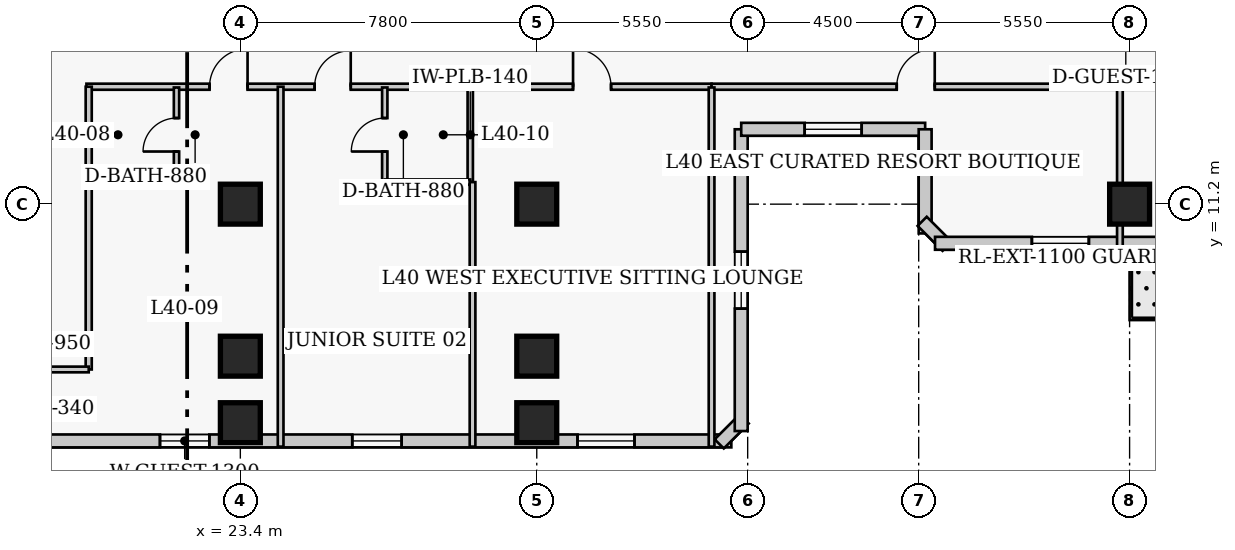
"""IFC4 building model, lengths in metres.
Left out: names, types, materials, properties, quantities, classifications, styles, units other than length and angle.
Written with IfcOpenShell. Run it as: python <this file> out.ifc"""

import sys

from ifc_helpers import new_model, si_unit, direction, frame, frame_2d, origin, origin_2d, place, context, subcontext, project, spatial, rectangle, extrude, element, fill, save


model = new_model("IFC4")
c1 = context("Model", 3, precision=1e-05, world=origin(), true_north=direction((0.0, 1.0)))
c2 = subcontext(c1, "Body", "Model", "MODEL_VIEW")
j1 = project(units=[si_unit("LENGTHUNIT", "METRE"), si_unit("PLANEANGLEUNIT", "RADIAN")], contexts=[c1])
p1 = place(None, origin())
s1 = spatial("IfcSite", under=j1, at=p1, CompositionType="ELEMENT")
p2 = place(p1, origin())
s2 = spatial("IfcBuilding", under=s1, at=p2, CompositionType="ELEMENT")
p3 = place(p2, frame((0.0, 0.0, 161.2)))
s3 = spatial("IfcBuildingStorey", under=s2, at=p3, CompositionType="ELEMENT", Elevation=161.2)
for number, where, z_axis, x_axis in (
    (1, (23.4, 11.2, 0.0), (0.0, 0.0, 1.0), (1.0, 0.0, 0.0)),
    (2, (31.2, 11.2, 0.0), (0.0, 0.0, 1.0), (1.0, 0.0, 0.0)),
    (3, (46.8, 11.2, 0.0), (0.0, 0.0, 1.0), (1.0, 0.0, 0.0)),
    (4, (23.4, 7.2, 0.0), (0.0, 0.0, 1.0), (1.0, 0.0, 0.0)),
    (5, (31.2, 7.2, 0.0), (0.0, 0.0, 1.0), (1.0, 0.0, 0.0)),
    (6, (23.4, 5.45, 0.0), (0.0, 0.0, 1.0), (1.0, 0.0, 0.0)),
    (7, (31.2, 5.45, 0.0), (0.0, 0.0, 1.0), (1.0, 0.0, 0.0)),
):
    element("IfcColumn", number, at=place(p3, frame(where, z_axis=z_axis, x_axis=x_axis)), inside=s3, PredefinedType="COLUMN", context=c2, shape_type="SweptSolid", body=[
        extrude(rectangle(XDim=1.05, YDim=1.05, at=origin_2d()), origin(), (0.0, 0.0, 1.0), 3.8),
    ])
p4 = place(p3, frame((9.63, 4.97, 0.0), z_axis=(0.0, 0.0, 1.0), x_axis=(1.0, 0.0, 0.0)))
e8 = element("IfcWall", 8, at=p4, inside=s3, PredefinedType="SOLIDWALL", context=c2, shape_type="SweptSolid", body=[
    extrude(rectangle(XDim=26.69, YDim=0.34, at=frame_2d((13.345, 0.0))), origin(), (0.0, 0.0, 1.0), 3.55),
])
p5 = place(p4, frame((3.048, 0.0, 0.85)))
e9 = element("IfcOpeningElement", 9, at=p5, cuts=e8, PredefinedType="OPENING", context=c2, shape_type="SweptSolid", body=[
    extrude(rectangle(XDim=1.5, YDim=1.75, at=frame_2d((0.75, 0.875))), frame((0.0, 0.18, 0.0), z_axis=(0.0, -1.0, 0.0), x_axis=(1.0, 0.0, 0.0)), (0.0, 0.0, 1.0), 0.36),
])
p6 = place(p4, frame((22.642, 0.0, 0.85)))
e10 = element("IfcOpeningElement", 10, at=p6, cuts=e8, PredefinedType="OPENING", context=c2, shape_type="SweptSolid", body=[
    extrude(rectangle(XDim=1.5, YDim=1.75, at=frame_2d((0.75, 0.875))), frame((0.0, 0.18, 0.0), z_axis=(0.0, -1.0, 0.0), x_axis=(1.0, 0.0, 0.0)), (0.0, 0.0, 1.0), 0.36),
])
p7 = place(p4, frame((11.655, 0.0, 0.85)))
e11 = element("IfcOpeningElement", 11, at=p7, cuts=e8, PredefinedType="OPENING", context=c2, shape_type="SweptSolid", body=[
    extrude(rectangle(XDim=1.3, YDim=1.7, at=frame_2d((0.65, 0.85))), frame((0.0, 0.18, 0.0), z_axis=(0.0, -1.0, 0.0), x_axis=(1.0, 0.0, 0.0)), (0.0, 0.0, 1.0), 0.36),
])
p8 = place(p4, frame((16.715, 0.0, 0.85)))
e12 = element("IfcOpeningElement", 12, at=p8, cuts=e8, PredefinedType="OPENING", context=c2, shape_type="SweptSolid", body=[
    extrude(rectangle(XDim=1.3, YDim=1.7, at=frame_2d((0.65, 0.85))), frame((0.0, 0.18, 0.0), z_axis=(0.0, -1.0, 0.0), x_axis=(1.0, 0.0, 0.0)), (0.0, 0.0, 1.0), 0.36),
])
p9 = place(p3, frame((36.001, 4.892, 0.0), z_axis=(0.0, 0.0, 1.0), x_axis=(0.707106781187, 0.707106781187, 0.0)))
e13 = element("IfcWall", 13, at=p9, inside=s3, PredefinedType="SOLIDWALL", context=c2, shape_type="SweptSolid", body=[
    extrude(rectangle(XDim=0.929, YDim=0.34, at=frame_2d((0.464, 0.0))), origin(), (0.0, 0.0, 1.0), 3.55),
])
p10 = place(p3, frame((36.58, 5.23, 0.0), z_axis=(0.0, 0.0, 1.0), x_axis=(0.0, 1.0, 0.0)))
e14 = element("IfcWall", 14, at=p10, inside=s3, PredefinedType="SOLIDWALL", context=c2, shape_type="SweptSolid", body=[
    extrude(rectangle(XDim=7.94, YDim=0.34, at=frame_2d((3.97, 0.0))), origin(), (0.0, 0.0, 1.0), 3.55),
])
p11 = place(p10, frame((3.22, 0.0, 0.85)))
e15 = element("IfcOpeningElement", 15, at=p11, cuts=e14, PredefinedType="OPENING", context=c2, shape_type="SweptSolid", body=[
    extrude(rectangle(XDim=1.5, YDim=1.75, at=frame_2d((0.75, 0.875))), frame((0.0, 0.18, 0.0), z_axis=(0.0, -1.0, 0.0), x_axis=(1.0, 0.0, 0.0)), (0.0, 0.0, 1.0), 0.36),
])
p12 = place(p3, frame((36.58, 13.17, 0.0), z_axis=(0.0, 0.0, 1.0), x_axis=(1.0, 0.0, 0.0)))
e16 = element("IfcWall", 16, at=p12, inside=s3, PredefinedType="SOLIDWALL", context=c2, shape_type="SweptSolid", body=[
    extrude(rectangle(XDim=4.84, YDim=0.34, at=frame_2d((2.42, 0.0))), origin(), (0.0, 0.0, 1.0), 3.55),
])
p13 = place(p12, frame((1.67, 0.0, 0.85)))
e17 = element("IfcOpeningElement", 17, at=p13, cuts=e16, PredefinedType="OPENING", context=c2, shape_type="SweptSolid", body=[
    extrude(rectangle(XDim=1.5, YDim=1.75, at=frame_2d((0.75, 0.875))), frame((0.0, 0.18, 0.0), z_axis=(0.0, -1.0, 0.0), x_axis=(1.0, 0.0, 0.0)), (0.0, 0.0, 1.0), 0.36),
])
p14 = place(p3, frame((41.42, 13.17, 0.0), z_axis=(0.0, 0.0, 1.0), x_axis=(0.0, -1.0, 0.0)))
e18 = element("IfcWall", 18, at=p14, inside=s3, PredefinedType="SOLIDWALL", context=c2, shape_type="SweptSolid", body=[
    extrude(rectangle(XDim=2.74, YDim=0.34, at=frame_2d((1.37, 0.0))), origin(), (0.0, 0.0, 1.0), 3.55),
])
p15 = place(p3, frame((41.342, 10.749, 0.0), z_axis=(0.0, 0.0, 1.0), x_axis=(0.707106781187, -0.707106781187, 0.0)))
e19 = element("IfcWall", 19, at=p15, inside=s3, PredefinedType="SOLIDWALL", context=c2, shape_type="SweptSolid", body=[
    extrude(rectangle(XDim=0.929, YDim=0.34, at=frame_2d((0.464, 0.0))), origin(), (0.0, 0.0, 1.0), 3.55),
])
p16 = place(p3, frame((41.68, 10.17, 0.0), z_axis=(0.0, 0.0, 1.0), x_axis=(1.0, 0.0, 0.0)))
e20 = element("IfcWall", 20, at=p16, inside=s3, PredefinedType="SOLIDWALL", context=c2, shape_type="SweptSolid", body=[
    extrude(rectangle(XDim=26.69, YDim=0.34, at=frame_2d((13.345, 0.0))), origin(), (0.0, 0.0, 1.0), 3.55),
])
p17 = place(p16, frame((2.548, 0.0, 0.85)))
e21 = element("IfcOpeningElement", 21, at=p17, cuts=e20, PredefinedType="OPENING", context=c2, shape_type="SweptSolid", body=[
    extrude(rectangle(XDim=1.5, YDim=1.75, at=frame_2d((0.75, 0.875))), frame((0.0, 0.18, 0.0), z_axis=(0.0, -1.0, 0.0), x_axis=(1.0, 0.0, 0.0)), (0.0, 0.0, 1.0), 0.36),
])
p18 = place(p16, frame((13.745, 0.0, 0.85)))
e22 = element("IfcOpeningElement", 22, at=p18, cuts=e20, PredefinedType="OPENING", context=c2, shape_type="SweptSolid", body=[
    extrude(rectangle(XDim=1.5, YDim=1.75, at=frame_2d((0.75, 0.875))), frame((0.0, 0.18, 0.0), z_axis=(0.0, -1.0, 0.0), x_axis=(1.0, 0.0, 0.0)), (0.0, 0.0, 1.0), 0.36),
])
p19 = place(p16, frame((21.492, 0.0, 0.85)))
e23 = element("IfcOpeningElement", 23, at=p19, cuts=e20, PredefinedType="OPENING", context=c2, shape_type="SweptSolid", body=[
    extrude(rectangle(XDim=1.5, YDim=1.75, at=frame_2d((0.75, 0.875))), frame((0.0, 0.18, 0.0), z_axis=(0.0, -1.0, 0.0), x_axis=(1.0, 0.0, 0.0)), (0.0, 0.0, 1.0), 0.36),
])
p20 = place(p16, frame((8.42, 0.0, 0.0)))
e24 = element("IfcOpeningElement", 24, at=p20, cuts=e20, PredefinedType="OPENING", context=c2, shape_type="SweptSolid", body=[
    extrude(rectangle(XDim=1.2, YDim=2.1, at=frame_2d((0.6, 1.05))), frame((0.0, 0.18, 0.0), z_axis=(0.0, -1.0, 0.0), x_axis=(1.0, 0.0, 0.0)), (0.0, 0.0, 1.0), 0.36),
])
p21 = place(p3, frame((19.35, 14.29, 0.0), z_axis=(0.0, 0.0, 1.0), x_axis=(1.0, 0.0, 0.0)))
e25 = element("IfcWall", 25, at=p21, inside=s3, PredefinedType="PARTITIONING", context=c2, shape_type="SweptSolid", body=[
    extrude(rectangle(XDim=16.45, YDim=0.16, at=frame_2d((8.225, 0.0))), origin(), (0.0, 0.0, 1.0), 3.55),
])
p22 = place(p21, frame((3.24, 0.0, 0.0)))
e26 = element("IfcOpeningElement", 26, at=p22, cuts=e25, PredefinedType="OPENING", context=c2, shape_type="SweptSolid", body=[
    extrude(rectangle(XDim=1.0, YDim=2.15, at=frame_2d((0.5, 1.075))), frame((0.0, 0.09, 0.0), z_axis=(0.0, -1.0, 0.0), x_axis=(1.0, 0.0, 0.0)), (0.0, 0.0, 1.0), 0.18),
])
p23 = place(p21, frame((6.005, 0.0, 0.0)))
e27 = element("IfcOpeningElement", 27, at=p23, cuts=e25, PredefinedType="OPENING", context=c2, shape_type="SweptSolid", body=[
    extrude(rectangle(XDim=0.95, YDim=2.1, at=frame_2d((0.475, 1.05))), frame((0.0, 0.09, 0.0), z_axis=(0.0, -1.0, 0.0), x_axis=(1.0, 0.0, 0.0)), (0.0, 0.0, 1.0), 0.18),
])
p24 = place(p21, frame((12.805, 0.0, 0.0)))
e28 = element("IfcOpeningElement", 28, at=p24, cuts=e25, PredefinedType="OPENING", context=c2, shape_type="SweptSolid", body=[
    extrude(rectangle(XDim=1.0, YDim=2.15, at=frame_2d((0.5, 1.075))), frame((0.0, 0.09, 0.0), z_axis=(0.0, -1.0, 0.0), x_axis=(1.0, 0.0, 0.0)), (0.0, 0.0, 1.0), 0.18),
])
p25 = place(p3, frame((35.8, 14.29, 0.0), z_axis=(0.0, 0.0, 1.0), x_axis=(1.0, 0.0, 0.0)))
e29 = element("IfcWall", 29, at=p25, inside=s3, PredefinedType="PARTITIONING", context=c2, shape_type="SweptSolid", body=[
    extrude(rectangle(XDim=22.65, YDim=0.16, at=frame_2d((11.325, 0.0))), origin(), (0.0, 0.0, 1.0), 3.55),
])
p26 = place(p25, frame((4.873, 0.0, 0.0)))
e30 = element("IfcOpeningElement", 30, at=p26, cuts=e29, PredefinedType="OPENING", context=c2, shape_type="SweptSolid", body=[
    extrude(rectangle(XDim=1.0, YDim=2.15, at=frame_2d((0.5, 1.075))), frame((0.0, 0.09, 0.0), z_axis=(0.0, -1.0, 0.0), x_axis=(1.0, 0.0, 0.0)), (0.0, 0.0, 1.0), 0.18),
])
p27 = place(p3, frame((19.41, 6.85, 0.0), z_axis=(0.0, 0.0, 1.0), x_axis=(0.0, 1.0, 0.0)))
e31 = element("IfcWall", 31, at=p27, inside=s3, PredefinedType="PARTITIONING", context=c2, shape_type="SweptSolid", body=[
    extrude(rectangle(XDim=7.44, YDim=0.16, at=frame_2d((3.72, 0.0))), origin(), (0.0, 0.0, 1.0), 3.093),
])
p28 = place(p3, frame((17.19, 6.85, 0.0), z_axis=(0.0, 0.0, 1.0), x_axis=(1.0, 0.0, 0.0)))
e32 = element("IfcWall", 32, at=p28, inside=s3, PredefinedType="PARTITIONING", context=c2, shape_type="SweptSolid", body=[
    extrude(rectangle(XDim=2.22, YDim=0.15, at=frame_2d((1.11, 0.0))), origin(), (0.0, 0.0, 1.0), 3.55),
])
p29 = place(p3, frame((21.72, 11.78, 0.0), z_axis=(0.0, 0.0, 1.0), x_axis=(0.0, 1.0, 0.0)))
e33 = element("IfcWall", 33, at=p29, inside=s3, PredefinedType="PLUMBINGWALL", context=c2, shape_type="SweptSolid", body=[
    extrude(rectangle(XDim=2.49, YDim=0.14, at=frame_2d((1.245, 0.0))), origin(), (0.0, 0.0, 1.0), 3.55),
])
p30 = place(p29, frame((0.805, 0.0, 0.0)))
e34 = element("IfcOpeningElement", 34, at=p30, cuts=e33, PredefinedType="OPENING", context=c2, shape_type="SweptSolid", body=[
    extrude(rectangle(XDim=0.88, YDim=2.05, at=frame_2d((0.44, 1.025))), frame((0.0, 0.08, 0.0), z_axis=(0.0, -1.0, 0.0), x_axis=(1.0, 0.0, 0.0)), (0.0, 0.0, 1.0), 0.16),
])
p31 = place(p3, frame((19.47, 11.78, 0.0), z_axis=(0.0, 0.0, 1.0), x_axis=(1.0, 0.0, 0.0)))
e35 = element("IfcWall", 35, at=p31, inside=s3, PredefinedType="PLUMBINGWALL", context=c2, shape_type="SweptSolid", body=[
    extrude(rectangle(XDim=2.25, YDim=0.14, at=frame_2d((1.125, 0.0))), origin(), (0.0, 0.0, 1.0), 3.55),
])
p32 = place(p3, frame((24.46, 4.82, 0.0), z_axis=(0.0, 0.0, 1.0), x_axis=(0.0, 1.0, 0.0)))
e36 = element("IfcWall", 36, at=p32, inside=s3, PredefinedType="PARTITIONING", context=c2, shape_type="SweptSolid", body=[
    extrude(rectangle(XDim=9.47, YDim=0.15, at=frame_2d((4.735, 0.0))), origin(), (0.0, 0.0, 1.0), 3.55),
])
p33 = place(p3, frame((27.2, 11.78, 0.0), z_axis=(0.0, 0.0, 1.0), x_axis=(0.0, 1.0, 0.0)))
e37 = element("IfcWall", 37, at=p33, inside=s3, PredefinedType="PLUMBINGWALL", context=c2, shape_type="SweptSolid", body=[
    extrude(rectangle(XDim=2.49, YDim=0.14, at=frame_2d((1.245, 0.0))), origin(), (0.0, 0.0, 1.0), 3.093),
])
p34 = place(p33, frame((0.805, 0.0, 0.0)))
e38 = element("IfcOpeningElement", 38, at=p34, cuts=e37, PredefinedType="OPENING", context=c2, shape_type="SweptSolid", body=[
    extrude(rectangle(XDim=0.88, YDim=2.05, at=frame_2d((0.44, 1.025))), frame((0.0, 0.08, 0.0), z_axis=(0.0, -1.0, 0.0), x_axis=(1.0, 0.0, 0.0)), (0.0, 0.0, 1.0), 0.16),
])
p35 = place(p3, frame((29.45, 11.78, 0.0), z_axis=(0.0, 0.0, 1.0), x_axis=(0.0, 1.0, 0.0)))
e39 = element("IfcWall", 39, at=p35, inside=s3, PredefinedType="PLUMBINGWALL", context=c2, shape_type="SweptSolid", body=[
    extrude(rectangle(XDim=2.49, YDim=0.14, at=frame_2d((1.245, 0.0))), origin(), (0.0, 0.0, 1.0), 3.55),
])
p36 = place(p3, frame((27.2, 11.78, 0.0), z_axis=(0.0, 0.0, 1.0), x_axis=(1.0, 0.0, 0.0)))
e40 = element("IfcWall", 40, at=p36, inside=s3, PredefinedType="PLUMBINGWALL", context=c2, shape_type="SweptSolid", body=[
    extrude(rectangle(XDim=2.25, YDim=0.14, at=frame_2d((1.125, 0.0))), origin(), (0.0, 0.0, 1.0), 3.55),
])
p37 = place(p3, frame((29.51, 4.82, 0.0), z_axis=(0.0, 0.0, 1.0), x_axis=(0.0, 1.0, 0.0)))
e41 = element("IfcWall", 41, at=p37, inside=s3, PredefinedType="PARTITIONING", context=c2, shape_type="SweptSolid", body=[
    extrude(rectangle(XDim=6.96, YDim=0.15, at=frame_2d((3.48, 0.0))), origin(), (0.0, 0.0, 1.0), 3.55),
])
p38 = place(p3, frame((35.8, 4.82, 0.0), z_axis=(0.0, 0.0, 1.0), x_axis=(0.0, 1.0, 0.0)))
e42 = element("IfcWall", 42, at=p38, inside=s3, PredefinedType="PARTITIONING", context=c2, shape_type="SweptSolid", body=[
    extrude(rectangle(XDim=9.45, YDim=0.15, at=frame_2d((4.725, 0.0))), origin(), (0.0, 0.0, 1.0), 3.55),
])
p39 = place(p3, frame((46.545, 10.02, 0.0), z_axis=(0.0, 0.0, 1.0), x_axis=(0.0, 1.0, 0.0)))
e43 = element("IfcWall", 43, at=p39, inside=s3, PredefinedType="PARTITIONING", context=c2, shape_type="SweptSolid", body=[
    extrude(rectangle(XDim=4.27, YDim=0.15, at=frame_2d((2.135, 0.0))), origin(), (0.0, 0.0, 1.0), 2.9),
])
p40 = place(p6, origin())
e44 = element("IfcWindow", 44, at=p40, inside=s3, PartitioningType="SINGLE_PANEL", PredefinedType="WINDOW", context=c2, shape_type="SweptSolid", body=[
    extrude(rectangle(XDim=1.5, YDim=1.75, at=frame_2d((0.75, 0.875))), frame((0.0, 0.03, 0.0), z_axis=(0.0, -1.0, 0.0), x_axis=(1.0, 0.0, 0.0)), (0.0, 0.0, 1.0), 0.06),
])
fill(e10, e44)
p41 = place(p11, origin())
e45 = element("IfcWindow", 45, at=p41, inside=s3, PartitioningType="SINGLE_PANEL", PredefinedType="WINDOW", context=c2, shape_type="SweptSolid", body=[
    extrude(rectangle(XDim=1.5, YDim=1.75, at=frame_2d((0.75, 0.875))), frame((0.0, 0.03, 0.0), z_axis=(0.0, -1.0, 0.0), x_axis=(1.0, 0.0, 0.0)), (0.0, 0.0, 1.0), 0.06),
])
fill(e15, e45)
p42 = place(p13, origin())
e46 = element("IfcWindow", 46, at=p42, inside=s3, PartitioningType="SINGLE_PANEL", PredefinedType="WINDOW", context=c2, shape_type="SweptSolid", body=[
    extrude(rectangle(XDim=1.5, YDim=1.75, at=frame_2d((0.75, 0.875))), frame((0.0, 0.03, 0.0), z_axis=(0.0, -1.0, 0.0), x_axis=(1.0, 0.0, 0.0)), (0.0, 0.0, 1.0), 0.06),
])
fill(e17, e46)
p43 = place(p17, origin())
e47 = element("IfcWindow", 47, at=p43, inside=s3, PartitioningType="SINGLE_PANEL", PredefinedType="WINDOW", context=c2, shape_type="SweptSolid", body=[
    extrude(rectangle(XDim=1.5, YDim=1.75, at=frame_2d((0.75, 0.875))), frame((0.0, 0.03, 0.0), z_axis=(0.0, -1.0, 0.0), x_axis=(1.0, 0.0, 0.0)), (0.0, 0.0, 1.0), 0.06),
])
fill(e21, e47)
p44 = place(p7, origin())
e48 = element("IfcWindow", 48, at=p44, inside=s3, PartitioningType="SINGLE_PANEL", PredefinedType="WINDOW", context=c2, shape_type="SweptSolid", body=[
    extrude(rectangle(XDim=1.3, YDim=1.7, at=frame_2d((0.65, 0.85))), frame((0.0, 0.03, 0.0), z_axis=(0.0, -1.0, 0.0), x_axis=(1.0, 0.0, 0.0)), (0.0, 0.0, 1.0), 0.06),
])
fill(e11, e48)
p45 = place(p8, origin())
e49 = element("IfcWindow", 49, at=p45, inside=s3, PartitioningType="SINGLE_PANEL", PredefinedType="WINDOW", context=c2, shape_type="SweptSolid", body=[
    extrude(rectangle(XDim=1.3, YDim=1.7, at=frame_2d((0.65, 0.85))), frame((0.0, 0.03, 0.0), z_axis=(0.0, -1.0, 0.0), x_axis=(1.0, 0.0, 0.0)), (0.0, 0.0, 1.0), 0.06),
])
fill(e12, e49)
p46 = place(p30, origin())
e50 = element("IfcDoor", 50, at=p46, inside=s3, OperationType="SINGLE_SWING_LEFT", PredefinedType="DOOR", context=c2, shape_type="SweptSolid", body=[
    extrude(rectangle(XDim=0.88, YDim=2.05, at=frame_2d((0.44, 1.025))), frame((0.0, 0.025, 0.0), z_axis=(0.0, -1.0, 0.0), x_axis=(1.0, 0.0, 0.0)), (0.0, 0.0, 1.0), 0.05),
])
fill(e34, e50)
p47 = place(p22, origin())
e51 = element("IfcDoor", 51, at=p47, inside=s3, OperationType="SINGLE_SWING_RIGHT", PredefinedType="DOOR", context=c2, shape_type="SweptSolid", body=[
    extrude(rectangle(XDim=1.0, YDim=2.15, at=frame_2d((0.5, 1.075))), frame((0.0, 0.025, 0.0), z_axis=(0.0, -1.0, 0.0), x_axis=(1.0, 0.0, 0.0)), (0.0, 0.0, 1.0), 0.05),
])
fill(e26, e51)
p48 = place(p34, origin())
e52 = element("IfcDoor", 52, at=p48, inside=s3, OperationType="SINGLE_SWING_LEFT", PredefinedType="DOOR", context=c2, shape_type="SweptSolid", body=[
    extrude(rectangle(XDim=0.88, YDim=2.05, at=frame_2d((0.44, 1.025))), frame((0.0, 0.025, 0.0), z_axis=(0.0, -1.0, 0.0), x_axis=(1.0, 0.0, 0.0)), (0.0, 0.0, 1.0), 0.05),
])
fill(e38, e52)
p49 = place(p23, origin())
e53 = element("IfcDoor", 53, at=p49, inside=s3, OperationType="SINGLE_SWING_RIGHT", PredefinedType="DOOR", context=c2, shape_type="SweptSolid", body=[
    extrude(rectangle(XDim=0.95, YDim=2.1, at=frame_2d((0.475, 1.05))), frame((0.0, 0.025, 0.0), z_axis=(0.0, -1.0, 0.0), x_axis=(1.0, 0.0, 0.0)), (0.0, 0.0, 1.0), 0.05),
])
fill(e27, e53)
p50 = place(p24, origin())
e54 = element("IfcDoor", 54, at=p50, inside=s3, OperationType="SINGLE_SWING_LEFT", PredefinedType="DOOR", context=c2, shape_type="SweptSolid", body=[
    extrude(rectangle(XDim=1.0, YDim=2.15, at=frame_2d((0.5, 1.075))), frame((0.0, 0.025, 0.0), z_axis=(0.0, -1.0, 0.0), x_axis=(1.0, 0.0, 0.0)), (0.0, 0.0, 1.0), 0.05),
])
fill(e28, e54)
p51 = place(p26, origin())
e55 = element("IfcDoor", 55, at=p51, inside=s3, OperationType="SINGLE_SWING_RIGHT", PredefinedType="DOOR", context=c2, shape_type="SweptSolid", body=[
    extrude(rectangle(XDim=1.0, YDim=2.15, at=frame_2d((0.5, 1.075))), frame((0.0, 0.025, 0.0), z_axis=(0.0, -1.0, 0.0), x_axis=(1.0, 0.0, 0.0)), (0.0, 0.0, 1.0), 0.05),
])
fill(e30, e55)
save(model, sys.argv[1])
